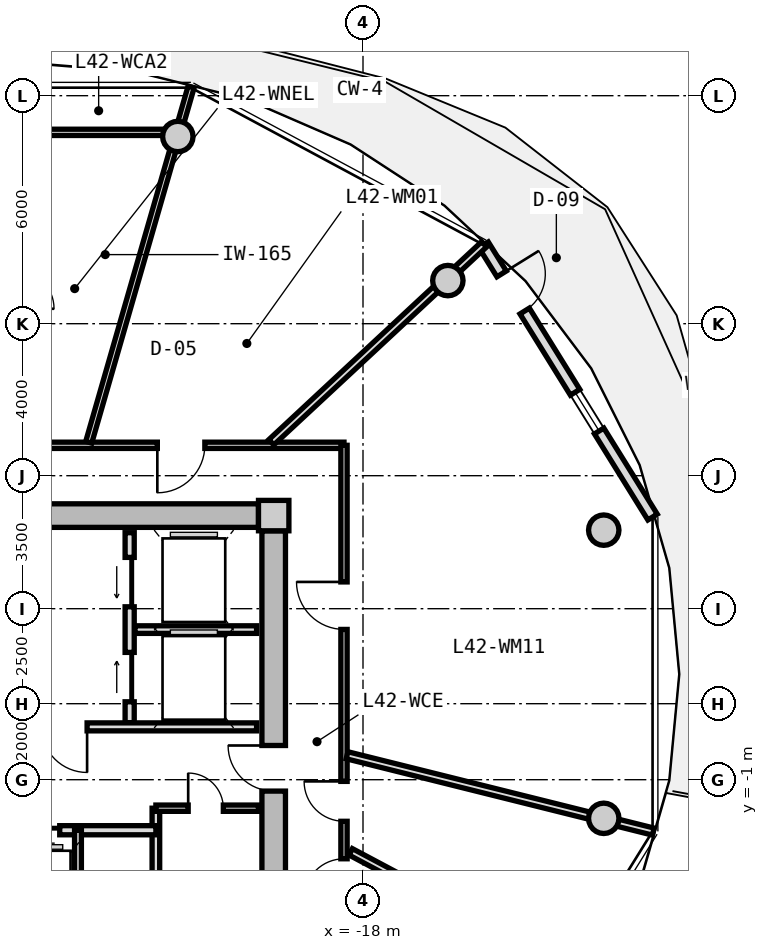
"""IFC4 building model, lengths in metres.
Left out: names, types, materials, properties, quantities, classifications, styles, units other than length and angle.
Written with IfcOpenShell. Run it as: python <this file> out.ifc"""

import sys

from ifc_helpers import new_model, si_unit, direction, frame, frame_2d, origin, origin_2d, place, context, subcontext, project, spatial, rectangle, circle, extrude, source, transform, mapped, element, fill, save


model = new_model("IFC4")
c1 = context("Model", 3, precision=1e-05, world=origin(), true_north=direction((0.0, 1.0)))
c2 = subcontext(c1, "Body", "Model", "MODEL_VIEW")
j1 = project(units=[si_unit("LENGTHUNIT", "METRE"), si_unit("PLANEANGLEUNIT", "RADIAN")], contexts=[c1])
p1 = place(None, origin())
s1 = spatial("IfcSite", under=j1, at=p1, CompositionType="ELEMENT")
p2 = place(p1, origin())
s2 = spatial("IfcBuilding", under=s1, at=p2, CompositionType="ELEMENT")
p3 = place(p2, frame((0.0, 0.0, 137.35)))
s3 = spatial("IfcBuildingStorey", under=s2, at=p3, CompositionType="ELEMENT", Elevation=137.35)
m1 = source(origin(), c2, "Body", "SweptSolid", [
    extrude(rectangle(XDim=0.8, YDim=0.8, at=origin_2d()), origin(), (0.0, 0.0, 1.0), 3.05),
])
p4 = place(p3, frame((-20.35, 5.95, 0.0), z_axis=(0.0, 0.0, 1.0), x_axis=(1.0, 0.0, 0.0)))
e1 = element("IfcColumn", 1, at=p4, inside=s3, PredefinedType="COLUMN", context=c2, shape_type="MappedRepresentation", body=[
    mapped(m1, transform((0.0, 0.0, 0.0), x_axis=(1.0, 0.0, 0.0), y_axis=(0.0, 1.0, 0.0), z_axis=(0.0, 0.0, 1.0), scale=1.0)),
])
m2 = source(origin(), c2, "Body", "SweptSolid", [
    extrude(rectangle(XDim=14.5, YDim=0.62, at=frame_2d((7.25, 0.0))), origin(), (0.0, 0.0, 1.0), 2.81),
])
p5 = place(p3, frame((-35.25, 5.95, 0.0), z_axis=(0.0, 0.0, 1.0), x_axis=(1.0, 0.0, 0.0)))
e2 = element("IfcWall", 2, at=p5, inside=s3, PredefinedType="SHEAR", context=c2, shape_type="MappedRepresentation", body=[
    mapped(m2, transform((0.0, 0.0, 0.0), x_axis=(1.0, 0.0, 0.0), y_axis=(0.0, 1.0, 0.0), z_axis=(0.0, 0.0, 1.0), scale=1.0)),
])
m3 = source(origin(), c2, "Body", "SweptSolid", [
    extrude(rectangle(XDim=11.1, YDim=0.62, at=frame_2d((5.55, 0.0))), origin(), (0.0, 0.0, 1.0), 2.81),
])
p6 = place(p3, frame((-20.35, 5.55, 0.0), z_axis=(0.0, 0.0, 1.0), x_axis=(0.0, -1.0, 0.0)))
e3 = element("IfcWall", 3, at=p6, inside=s3, PredefinedType="SHEAR", context=c2, shape_type="MappedRepresentation", body=[
    mapped(m3, transform((0.0, 0.0, 0.0), x_axis=(1.0, 0.0, 0.0), y_axis=(0.0, 1.0, 0.0), z_axis=(0.0, 0.0, 1.0), scale=1.0)),
])
p7 = place(p6, frame((5.65, 0.0, 0.0)))
e4 = element("IfcOpeningElement", 4, at=p7, cuts=e3, PredefinedType="OPENING", context=c2, shape_type="SweptSolid", body=[
    extrude(rectangle(XDim=1.2, YDim=2.15, at=frame_2d((0.6, 1.075))), frame((0.0, 0.32, 0.0), z_axis=(0.0, -1.0, 0.0), x_axis=(1.0, 0.0, 0.0)), (0.0, 0.0, 1.0), 0.64),
])
m4 = source(origin(), c2, "Body", "SweptSolid", [
    extrude(circle(Radius=0.4, at=origin_2d()), origin(), (0.0, 0.0, 1.0), 3.05),
])
for number, where, z_axis, x_axis in (
    (5, (-11.665, 5.567, 0.0), (0.0, 0.0, 1.0), (1.0, 0.0, 0.0)),
    (6, (-15.767, 12.135, 0.0), (0.0, 0.0, 1.0), (1.0, 0.0, 0.0)),
    (7, (-22.873, 15.926, 0.0), (0.0, 0.0, 1.0), (1.0, 0.0, 0.0)),
    (8, (-11.665, -2.016, 0.0), (0.0, 0.0, 1.0), (1.0, 0.0, 0.0)),
):
    element("IfcColumn", number, at=place(p3, frame(where, z_axis=z_axis, x_axis=x_axis)), inside=s3, PredefinedType="COLUMN", context=c2, shape_type="MappedRepresentation", body=[
        mapped(m4, transform((0.0, 0.0, 0.0), x_axis=(1.0, 0.0, 0.0), y_axis=(0.0, 1.0, 0.0), z_axis=(0.0, 0.0, 1.0), scale=1.0)),
    ])
m5 = source(origin(), c2, "Body", "SweptSolid", [
    extrude(rectangle(XDim=8.431, YDim=0.29, at=frame_2d((4.216, 0.0))), origin(), (0.0, 0.0, 1.0), 2.81),
])
p8 = place(p3, frame((-14.827, 13.075, 0.0), z_axis=(0.0, 0.0, 1.0), x_axis=(0.527377998418, -0.849630770855, 0.0)))
e9 = element("IfcWall", 9, at=p8, inside=s3, PredefinedType="SOLIDWALL", context=c2, shape_type="MappedRepresentation", body=[
    mapped(m5, transform((0.0, 0.0, 0.0), x_axis=(1.0, 0.0, 0.0), y_axis=(0.0, 1.0, 0.0), z_axis=(0.0, 0.0, 1.0), scale=1.0)),
])
p9 = place(p8, frame((0.9, 0.0, 0.0)))
e10 = element("IfcOpeningElement", 10, at=p9, cuts=e9, PredefinedType="OPENING", context=c2, shape_type="SweptSolid", body=[
    extrude(rectangle(XDim=1.15, YDim=2.25, at=frame_2d((0.575, 1.125))), frame((0.0, 0.155, 0.0), z_axis=(0.0, -1.0, 0.0), x_axis=(1.0, 0.0, 0.0)), (0.0, 0.0, 1.0), 0.31),
])
p10 = place(p8, frame((4.566, 0.0, 0.85)))
e11 = element("IfcOpeningElement", 11, at=p10, cuts=e9, PredefinedType="OPENING", context=c2, shape_type="SweptSolid", body=[
    extrude(rectangle(XDim=1.2, YDim=1.5, at=frame_2d((0.6, 0.75))), frame((0.0, 0.155, 0.0), z_axis=(0.0, -1.0, 0.0), x_axis=(1.0, 0.0, 0.0)), (0.0, 0.0, 1.0), 0.31),
])
m6 = source(origin(), c2, "Body", "SweptSolid", [
    extrude(rectangle(XDim=5.0, YDim=0.24, at=frame_2d((2.5, 0.0))), origin(), (0.0, 0.0, 1.0), 2.795),
])
p11 = place(p3, frame((-24.14, 0.5, 0.0), z_axis=(0.0, 0.0, 1.0), x_axis=(0.0, 1.0, 0.0)))
e12 = element("IfcWall", 12, at=p11, inside=s3, PredefinedType="PARTITIONING", context=c2, shape_type="MappedRepresentation", body=[
    mapped(m6, transform((0.0, 0.0, 0.0), x_axis=(1.0, 0.0, 0.0), y_axis=(0.0, 1.0, 0.0), z_axis=(0.0, 0.0, 1.0), scale=1.0)),
])
p12 = place(p11, frame((3.05, 0.0, 0.0)))
e13 = element("IfcOpeningElement", 13, at=p12, cuts=e12, PredefinedType="OPENING", context=c2, shape_type="SweptSolid", body=[
    extrude(rectangle(XDim=1.3, YDim=2.2, at=frame_2d((0.65, 1.1))), frame((0.0, 0.13, 0.0), z_axis=(0.0, -1.0, 0.0), x_axis=(1.0, 0.0, 0.0)), (0.0, 0.0, 1.0), 0.26),
])
p13 = place(p11, frame((0.55, 0.0, 0.0)))
e14 = element("IfcOpeningElement", 14, at=p13, cuts=e12, PredefinedType="OPENING", context=c2, shape_type="SweptSolid", body=[
    extrude(rectangle(XDim=1.3, YDim=2.2, at=frame_2d((0.65, 1.1))), frame((0.0, 0.13, 0.0), z_axis=(0.0, -1.0, 0.0), x_axis=(1.0, 0.0, 0.0)), (0.0, 0.0, 1.0), 0.26),
])
m7 = source(origin(), c2, "Body", "SweptSolid", [
    extrude(rectangle(XDim=3.2, YDim=0.2, at=frame_2d((1.6, 0.0))), origin(), (0.0, 0.0, 1.0), 2.795),
])
p14 = place(p3, frame((-24.0, 2.95, 0.0), z_axis=(0.0, 0.0, 1.0), x_axis=(1.0, 0.0, 0.0)))
e15 = element("IfcWall", 15, at=p14, inside=s3, PredefinedType="PARTITIONING", context=c2, shape_type="MappedRepresentation", body=[
    mapped(m7, transform((0.0, 0.0, 0.0), x_axis=(1.0, 0.0, 0.0), y_axis=(0.0, 1.0, 0.0), z_axis=(0.0, 0.0, 1.0), scale=1.0)),
])
m8 = source(origin(), c2, "Body", "SweptSolid", [
    extrude(rectangle(XDim=6.66, YDim=0.21, at=frame_2d((3.33, 0.0))), origin(), (0.0, 0.0, 1.0), 2.795),
])
p15 = place(p3, frame((-27.46, 0.39, 0.0), z_axis=(0.0, 0.0, 1.0), x_axis=(1.0, 0.0, 0.0)))
e16 = element("IfcWall", 16, at=p15, inside=s3, PredefinedType="PARTITIONING", context=c2, shape_type="MappedRepresentation", body=[
    mapped(m8, transform((0.0, 0.0, 0.0), x_axis=(1.0, 0.0, 0.0), y_axis=(0.0, 1.0, 0.0), z_axis=(0.0, 0.0, 1.0), scale=1.0)),
])
p16 = place(p15, frame((1.0, 0.0, 0.0)))
e17 = element("IfcOpeningElement", 17, at=p16, cuts=e16, PredefinedType="OPENING", context=c2, shape_type="SweptSolid", body=[
    extrude(rectangle(XDim=1.2, YDim=2.15, at=frame_2d((0.6, 1.075))), frame((0.0, 0.115, 0.0), z_axis=(0.0, -1.0, 0.0), x_axis=(1.0, 0.0, 0.0)), (0.0, 0.0, 1.0), 0.23),
])
m9 = source(origin(), c2, "Body", "SweptSolid", [
    extrude(rectangle(XDim=3.8, YDim=0.2, at=frame_2d((1.9, 0.0))), origin(), (0.0, 0.0, 1.0), 2.795),
])
p17 = place(p3, frame((-23.45, -5.55, 0.0), z_axis=(0.0, 0.0, 1.0), x_axis=(0.0, 1.0, 0.0)))
e18 = element("IfcWall", 18, at=p17, inside=s3, PredefinedType="PARTITIONING", context=c2, shape_type="MappedRepresentation", body=[
    mapped(m9, transform((0.0, 0.0, 0.0), x_axis=(1.0, 0.0, 0.0), y_axis=(0.0, 1.0, 0.0), z_axis=(0.0, 0.0, 1.0), scale=1.0)),
])
m10 = source(origin(), c2, "Body", "SweptSolid", [
    extrude(rectangle(XDim=4.13, YDim=0.24, at=frame_2d((2.065, 0.0))), origin(), (0.0, 0.0, 1.0), 2.795),
])
p18 = place(p3, frame((-27.58, -2.33, 0.0), z_axis=(0.0, 0.0, 1.0), x_axis=(1.0, 0.0, 0.0)))
e19 = element("IfcWall", 19, at=p18, inside=s3, PredefinedType="PARTITIONING", context=c2, shape_type="MappedRepresentation", body=[
    mapped(m10, transform((0.0, 0.0, 0.0), x_axis=(1.0, 0.0, 0.0), y_axis=(0.0, 1.0, 0.0), z_axis=(0.0, 0.0, 1.0), scale=1.0)),
])
p19 = place(p18, frame((0.5, 0.0, 0.0)))
e20 = element("IfcOpeningElement", 20, at=p19, cuts=e19, PredefinedType="OPENING", context=c2, shape_type="SweptSolid", body=[
    extrude(rectangle(XDim=1.1, YDim=2.2, at=frame_2d((0.55, 1.1))), frame((0.0, 0.13, 0.0), z_axis=(0.0, -1.0, 0.0), x_axis=(1.0, 0.0, 0.0)), (0.0, 0.0, 1.0), 0.26),
])
m11 = source(origin(), c2, "Body", "SweptSolid", [
    extrude(rectangle(XDim=3.22, YDim=0.18, at=frame_2d((1.61, 0.0))), origin(), (0.0, 0.0, 1.0), 2.795),
])
p20 = place(p3, frame((-25.5, -5.55, 0.0), z_axis=(0.0, 0.0, 1.0), x_axis=(0.0, 1.0, 0.0)))
e21 = element("IfcWall", 21, at=p20, inside=s3, PredefinedType="PARTITIONING", context=c2, shape_type="MappedRepresentation", body=[
    mapped(m11, transform((0.0, 0.0, 0.0), x_axis=(1.0, 0.0, 0.0), y_axis=(0.0, 1.0, 0.0), z_axis=(0.0, 0.0, 1.0), scale=1.0)),
])
m12 = source(origin(), c2, "Body", "SweptSolid", [
    extrude(rectangle(XDim=2.7, YDim=0.165, at=frame_2d((1.35, 0.0))), origin(), (0.0, 0.0, 1.0), 2.795),
])
p21 = place(p3, frame((-23.45, -1.75, 0.0), z_axis=(0.0, 0.0, 1.0), x_axis=(1.0, 0.0, 0.0)))
e22 = element("IfcWall", 22, at=p21, inside=s3, PredefinedType="PARTITIONING", context=c2, shape_type="MappedRepresentation", body=[
    mapped(m12, transform((0.0, 0.0, 0.0), x_axis=(1.0, 0.0, 0.0), y_axis=(0.0, 1.0, 0.0), z_axis=(0.0, 0.0, 1.0), scale=1.0)),
])
p22 = place(p21, frame((0.85, 0.0, 0.0)))
e23 = element("IfcOpeningElement", 23, at=p22, cuts=e22, PredefinedType="OPENING", context=c2, shape_type="SweptSolid", body=[
    extrude(rectangle(XDim=0.925, YDim=2.1, at=frame_2d((0.462, 1.05))), frame((0.0, 0.093, 0.0), z_axis=(0.0, -1.0, 0.0), x_axis=(1.0, 0.0, 0.0)), (0.0, 0.0, 1.0), 0.185),
])
m13 = source(origin(), c2, "Body", "SweptSolid", [
    extrude(rectangle(XDim=8.6, YDim=0.165, at=frame_2d((4.3, 0.0))), origin(), (0.0, 0.0, 1.0), 2.795),
])
p23 = place(p3, frame((-27.1, 7.8, 0.0), z_axis=(0.0, 0.0, 1.0), x_axis=(1.0, 0.0, 0.0)))
e24 = element("IfcWall", 24, at=p23, inside=s3, PredefinedType="PARTITIONING", context=c2, shape_type="MappedRepresentation", body=[
    mapped(m13, transform((0.0, 0.0, 0.0), x_axis=(1.0, 0.0, 0.0), y_axis=(0.0, 1.0, 0.0), z_axis=(0.0, 0.0, 1.0), scale=1.0)),
])
p24 = place(p23, frame((3.688, 0.0, 0.0)))
e25 = element("IfcOpeningElement", 25, at=p24, cuts=e24, PredefinedType="OPENING", context=c2, shape_type="SweptSolid", body=[
    extrude(rectangle(XDim=1.25, YDim=2.2, at=frame_2d((0.625, 1.1))), frame((0.0, 0.093, 0.0), z_axis=(0.0, -1.0, 0.0), x_axis=(1.0, 0.0, 0.0)), (0.0, 0.0, 1.0), 0.185),
])
m14 = source(origin(), c2, "Body", "SweptSolid", [
    extrude(rectangle(XDim=15.6, YDim=0.165, at=frame_2d((7.8, 0.0))), origin(), (0.0, 0.0, 1.0), 2.795),
])
p25 = place(p3, frame((-18.5, 7.8, 0.0), z_axis=(0.0, 0.0, 1.0), x_axis=(0.0, -1.0, 0.0)))
e26 = element("IfcWall", 26, at=p25, inside=s3, PredefinedType="PARTITIONING", context=c2, shape_type="MappedRepresentation", body=[
    mapped(m14, transform((0.0, 0.0, 0.0), x_axis=(1.0, 0.0, 0.0), y_axis=(0.0, 1.0, 0.0), z_axis=(0.0, 0.0, 1.0), scale=1.0)),
])
p26 = place(p25, frame((10.881, 0.0, 0.0)))
e27 = element("IfcOpeningElement", 27, at=p26, cuts=e26, PredefinedType="OPENING", context=c2, shape_type="SweptSolid", body=[
    extrude(rectangle(XDim=1.05, YDim=2.15, at=frame_2d((0.525, 1.075))), frame((0.0, 0.093, 0.0), z_axis=(0.0, -1.0, 0.0), x_axis=(1.0, 0.0, 0.0)), (0.0, 0.0, 1.0), 0.185),
])
p27 = place(p25, frame((8.844, 0.0, 0.0)))
e28 = element("IfcOpeningElement", 28, at=p27, cuts=e26, PredefinedType="OPENING", context=c2, shape_type="SweptSolid", body=[
    extrude(rectangle(XDim=1.05, YDim=2.15, at=frame_2d((0.525, 1.075))), frame((0.0, 0.093, 0.0), z_axis=(0.0, -1.0, 0.0), x_axis=(1.0, 0.0, 0.0)), (0.0, 0.0, 1.0), 0.185),
])
p28 = place(p25, frame((3.596, 0.0, 0.0)))
e29 = element("IfcOpeningElement", 29, at=p28, cuts=e26, PredefinedType="OPENING", context=c2, shape_type="SweptSolid", body=[
    extrude(rectangle(XDim=1.25, YDim=2.2, at=frame_2d((0.625, 1.1))), frame((0.0, 0.093, 0.0), z_axis=(0.0, -1.0, 0.0), x_axis=(1.0, 0.0, 0.0)), (0.0, 0.0, 1.0), 0.185),
])
m15 = source(origin(), c2, "Body", "SweptSolid", [
    extrude(rectangle(XDim=9.73, YDim=0.165, at=frame_2d((4.865, 0.0))), origin(), (0.0, 0.0, 1.0), 2.345),
])
p29 = place(p3, frame((-25.217, 7.88, 0.0), z_axis=(0.0, 0.0, 1.0), x_axis=(0.27679492614, 0.960929013436, 0.0)))
e30 = element("IfcWall", 30, at=p29, inside=s3, PredefinedType="PARTITIONING", context=c2, shape_type="MappedRepresentation", body=[
    mapped(m15, transform((0.0, 0.0, 0.0), x_axis=(1.0, 0.0, 0.0), y_axis=(0.0, 1.0, 0.0), z_axis=(0.0, 0.0, 1.0), scale=1.0)),
])
m16 = source(origin(), c2, "Body", "SweptSolid", [
    extrude(rectangle(XDim=4.469, YDim=0.165, at=frame_2d((2.234, 0.0))), origin(), (0.0, 0.0, 1.0), 2.345),
])
p30 = place(p3, frame((-27.18, 16.035, 0.0), z_axis=(0.0, 0.0, 1.0), x_axis=(1.0, 0.0, 0.0)))
e31 = element("IfcWall", 31, at=p30, inside=s3, PredefinedType="PARTITIONING", context=c2, shape_type="MappedRepresentation", body=[
    mapped(m16, transform((0.0, 0.0, 0.0), x_axis=(1.0, 0.0, 0.0), y_axis=(0.0, 1.0, 0.0), z_axis=(0.0, 0.0, 1.0), scale=1.0)),
])
m17 = source(origin(), c2, "Body", "SweptSolid", [
    extrude(rectangle(XDim=8.305, YDim=0.19, at=frame_2d((4.153, 0.0))), origin(), (0.0, 0.0, 1.0), 2.345),
])
p31 = place(p3, frame((-18.42, -0.357, 0.0), z_axis=(0.0, 0.0, 1.0), x_axis=(0.970309994378, -0.241864662175, 0.0)))
e32 = element("IfcWall", 32, at=p31, inside=s3, PredefinedType="PARTITIONING", context=c2, shape_type="MappedRepresentation", body=[
    mapped(m17, transform((0.0, 0.0, 0.0), x_axis=(1.0, 0.0, 0.0), y_axis=(0.0, 1.0, 0.0), z_axis=(0.0, 0.0, 1.0), scale=1.0)),
])
m18 = source(origin(), c2, "Body", "SweptSolid", [
    extrude(rectangle(XDim=6.499, YDim=0.19, at=frame_2d((3.25, 0.0))), origin(), (0.0, 0.0, 1.0), 2.795),
])
p32 = place(p3, frame((-18.324, -2.898, 0.0), z_axis=(0.0, 0.0, 1.0), x_axis=(0.882700013711, -0.469936895545, 0.0)))
e33 = element("IfcWall", 33, at=p32, inside=s3, PredefinedType="PARTITIONING", context=c2, shape_type="MappedRepresentation", body=[
    mapped(m18, transform((0.0, 0.0, 0.0), x_axis=(1.0, 0.0, 0.0), y_axis=(0.0, 1.0, 0.0), z_axis=(0.0, 0.0, 1.0), scale=1.0)),
])
m19 = source(origin(), c2, "Body", "SweptSolid", [
    extrude(rectangle(XDim=7.648, YDim=0.19, at=frame_2d((3.824, 0.0))), origin(), (0.0, 0.0, 1.0), 2.345),
])
p33 = place(p3, frame((-20.413, 7.88, 0.0), z_axis=(0.0, 0.0, 1.0), x_axis=(0.732182665826, 0.681108320213, 0.0)))
e34 = element("IfcWall", 34, at=p33, inside=s3, PredefinedType="PARTITIONING", context=c2, shape_type="MappedRepresentation", body=[
    mapped(m19, transform((0.0, 0.0, 0.0), x_axis=(1.0, 0.0, 0.0), y_axis=(0.0, 1.0, 0.0), z_axis=(0.0, 0.0, 1.0), scale=1.0)),
])
m20 = source(origin(), c2, "Body", "SweptSolid", [
    extrude(rectangle(XDim=1.15, YDim=2.25, at=frame_2d((0.575, 1.125))), frame((0.0, 0.025, 0.0), z_axis=(0.0, -1.0, 0.0), x_axis=(1.0, 0.0, 0.0)), (0.0, 0.0, 1.0), 0.05),
])
p34 = place(p9, origin())
e35 = element("IfcDoor", 35, at=p34, inside=s3, OperationType="SINGLE_SWING_LEFT", PredefinedType="DOOR", context=c2, shape_type="MappedRepresentation", body=[
    mapped(m20, transform((0.0, 0.0, 0.0), x_axis=(1.0, 0.0, 0.0), y_axis=(0.0, 1.0, 0.0), z_axis=(0.0, 0.0, 1.0), scale=1.0)),
])
fill(e10, e35)
m21 = source(origin(), c2, "Body", "SweptSolid", [
    extrude(rectangle(XDim=1.2, YDim=1.5, at=frame_2d((0.6, 0.75))), frame((0.0, 0.03, 0.0), z_axis=(0.0, -1.0, 0.0), x_axis=(1.0, 0.0, 0.0)), (0.0, 0.0, 1.0), 0.06),
])
p35 = place(p10, origin())
e36 = element("IfcWindow", 36, at=p35, inside=s3, PartitioningType="SINGLE_PANEL", PredefinedType="WINDOW", context=c2, shape_type="MappedRepresentation", body=[
    mapped(m21, transform((0.0, 0.0, 0.0), x_axis=(1.0, 0.0, 0.0), y_axis=(0.0, 1.0, 0.0), z_axis=(0.0, 0.0, 1.0), scale=1.0)),
])
fill(e11, e36)
m22 = source(origin(), c2, "Body", "SweptSolid", [
    extrude(rectangle(XDim=1.3, YDim=2.2, at=frame_2d((0.65, 1.1))), frame((0.0, 0.025, 0.0), z_axis=(0.0, -1.0, 0.0), x_axis=(1.0, 0.0, 0.0)), (0.0, 0.0, 1.0), 0.05),
])
p36 = place(p12, origin())
e37 = element("IfcDoor", 37, at=p36, inside=s3, OperationType="SLIDING_TO_LEFT", PredefinedType="DOOR", context=c2, shape_type="MappedRepresentation", body=[
    mapped(m22, transform((0.0, 0.0, 0.0), x_axis=(1.0, 0.0, 0.0), y_axis=(0.0, 1.0, 0.0), z_axis=(0.0, 0.0, 1.0), scale=1.0)),
])
fill(e13, e37)
p37 = place(p13, origin())
e38 = element("IfcDoor", 38, at=p37, inside=s3, OperationType="SLIDING_TO_RIGHT", PredefinedType="DOOR", context=c2, shape_type="MappedRepresentation", body=[
    mapped(m22, transform((0.0, 0.0, 0.0), x_axis=(1.0, 0.0, 0.0), y_axis=(0.0, 1.0, 0.0), z_axis=(0.0, 0.0, 1.0), scale=1.0)),
])
fill(e14, e38)
m23 = source(origin(), c2, "Body", "SweptSolid", [
    extrude(rectangle(XDim=1.2, YDim=2.15, at=frame_2d((0.6, 1.075))), frame((0.0, 0.025, 0.0), z_axis=(0.0, -1.0, 0.0), x_axis=(1.0, 0.0, 0.0)), (0.0, 0.0, 1.0), 0.05),
])
p38 = place(p16, frame((1.2, 0.0, 0.0), z_axis=(0.0, 0.0, 1.0), x_axis=(-1.0, 0.0, 0.0)))
e39 = element("IfcDoor", 39, at=p38, inside=s3, OperationType="SINGLE_SWING_LEFT", PredefinedType="DOOR", context=c2, shape_type="MappedRepresentation", body=[
    mapped(m23, transform((0.0, 0.0, 0.0), x_axis=(1.0, 0.0, 0.0), y_axis=(0.0, 1.0, 0.0), z_axis=(0.0, 0.0, 1.0), scale=1.0)),
])
fill(e17, e39)
p39 = place(p7, frame((1.2, 0.0, 0.0), z_axis=(0.0, 0.0, 1.0), x_axis=(-1.0, 0.0, 0.0)))
e40 = element("IfcDoor", 40, at=p39, inside=s3, OperationType="SINGLE_SWING_RIGHT", PredefinedType="DOOR", context=c2, shape_type="MappedRepresentation", body=[
    mapped(m23, transform((0.0, 0.0, 0.0), x_axis=(1.0, 0.0, 0.0), y_axis=(0.0, 1.0, 0.0), z_axis=(0.0, 0.0, 1.0), scale=1.0)),
])
fill(e4, e40)
m24 = source(origin(), c2, "Body", "SweptSolid", [
    extrude(rectangle(XDim=1.1, YDim=2.2, at=frame_2d((0.55, 1.1))), frame((0.0, 0.025, 0.0), z_axis=(0.0, -1.0, 0.0), x_axis=(1.0, 0.0, 0.0)), (0.0, 0.0, 1.0), 0.05),
])
p40 = place(p19, frame((1.1, 0.0, 0.0), z_axis=(0.0, 0.0, 1.0), x_axis=(-1.0, 0.0, 0.0)))
e41 = element("IfcDoor", 41, at=p40, inside=s3, OperationType="SLIDING_TO_LEFT", PredefinedType="DOOR", context=c2, shape_type="MappedRepresentation", body=[
    mapped(m24, transform((0.0, 0.0, 0.0), x_axis=(1.0, 0.0, 0.0), y_axis=(0.0, 1.0, 0.0), z_axis=(0.0, 0.0, 1.0), scale=1.0)),
])
fill(e20, e41)
m25 = source(origin(), c2, "Body", "SweptSolid", [
    extrude(rectangle(XDim=0.925, YDim=2.1, at=frame_2d((0.462, 1.05))), frame((0.0, 0.025, 0.0), z_axis=(0.0, -1.0, 0.0), x_axis=(1.0, 0.0, 0.0)), (0.0, 0.0, 1.0), 0.05),
])
p41 = place(p22, origin())
e42 = element("IfcDoor", 42, at=p41, inside=s3, OperationType="SINGLE_SWING_LEFT", PredefinedType="DOOR", context=c2, shape_type="MappedRepresentation", body=[
    mapped(m25, transform((0.0, 0.0, 0.0), x_axis=(1.0, 0.0, 0.0), y_axis=(0.0, 1.0, 0.0), z_axis=(0.0, 0.0, 1.0), scale=1.0)),
])
fill(e23, e42)
m26 = source(origin(), c2, "Body", "SweptSolid", [
    extrude(rectangle(XDim=1.05, YDim=2.15, at=frame_2d((0.525, 1.075))), frame((0.0, 0.025, 0.0), z_axis=(0.0, -1.0, 0.0), x_axis=(1.0, 0.0, 0.0)), (0.0, 0.0, 1.0), 0.05),
])
p42 = place(p26, frame((1.05, 0.0, 0.0), z_axis=(0.0, 0.0, 1.0), x_axis=(-1.0, 0.0, 0.0)))
e43 = element("IfcDoor", 43, at=p42, inside=s3, OperationType="SINGLE_SWING_LEFT", PredefinedType="DOOR", context=c2, shape_type="MappedRepresentation", body=[
    mapped(m26, transform((0.0, 0.0, 0.0), x_axis=(1.0, 0.0, 0.0), y_axis=(0.0, 1.0, 0.0), z_axis=(0.0, 0.0, 1.0), scale=1.0)),
])
fill(e27, e43)
p43 = place(p27, frame((1.05, 0.0, 0.0), z_axis=(0.0, 0.0, 1.0), x_axis=(-1.0, 0.0, 0.0)))
e44 = element("IfcDoor", 44, at=p43, inside=s3, OperationType="SINGLE_SWING_RIGHT", PredefinedType="DOOR", context=c2, shape_type="MappedRepresentation", body=[
    mapped(m26, transform((0.0, 0.0, 0.0), x_axis=(1.0, 0.0, 0.0), y_axis=(0.0, 1.0, 0.0), z_axis=(0.0, 0.0, 1.0), scale=1.0)),
])
fill(e28, e44)
m27 = source(origin(), c2, "Body", "SweptSolid", [
    extrude(rectangle(XDim=1.25, YDim=2.2, at=frame_2d((0.625, 1.1))), frame((0.0, 0.025, 0.0), z_axis=(0.0, -1.0, 0.0), x_axis=(1.0, 0.0, 0.0)), (0.0, 0.0, 1.0), 0.05),
])
p44 = place(p28, frame((1.25, 0.0, 0.0), z_axis=(0.0, 0.0, 1.0), x_axis=(-1.0, 0.0, 0.0)))
e45 = element("IfcDoor", 45, at=p44, inside=s3, OperationType="SINGLE_SWING_RIGHT", PredefinedType="DOOR", context=c2, shape_type="MappedRepresentation", body=[
    mapped(m27, transform((0.0, 0.0, 0.0), x_axis=(1.0, 0.0, 0.0), y_axis=(0.0, 1.0, 0.0), z_axis=(0.0, 0.0, 1.0), scale=1.0)),
])
fill(e29, e45)
p45 = place(p24, frame((1.25, 0.0, 0.0), z_axis=(0.0, 0.0, 1.0), x_axis=(-1.0, 0.0, 0.0)))
e46 = element("IfcDoor", 46, at=p45, inside=s3, OperationType="SINGLE_SWING_RIGHT", PredefinedType="DOOR", context=c2, shape_type="MappedRepresentation", body=[
    mapped(m27, transform((0.0, 0.0, 0.0), x_axis=(1.0, 0.0, 0.0), y_axis=(0.0, 1.0, 0.0), z_axis=(0.0, 0.0, 1.0), scale=1.0)),
])
fill(e25, e46)
save(model, sys.argv[1])
